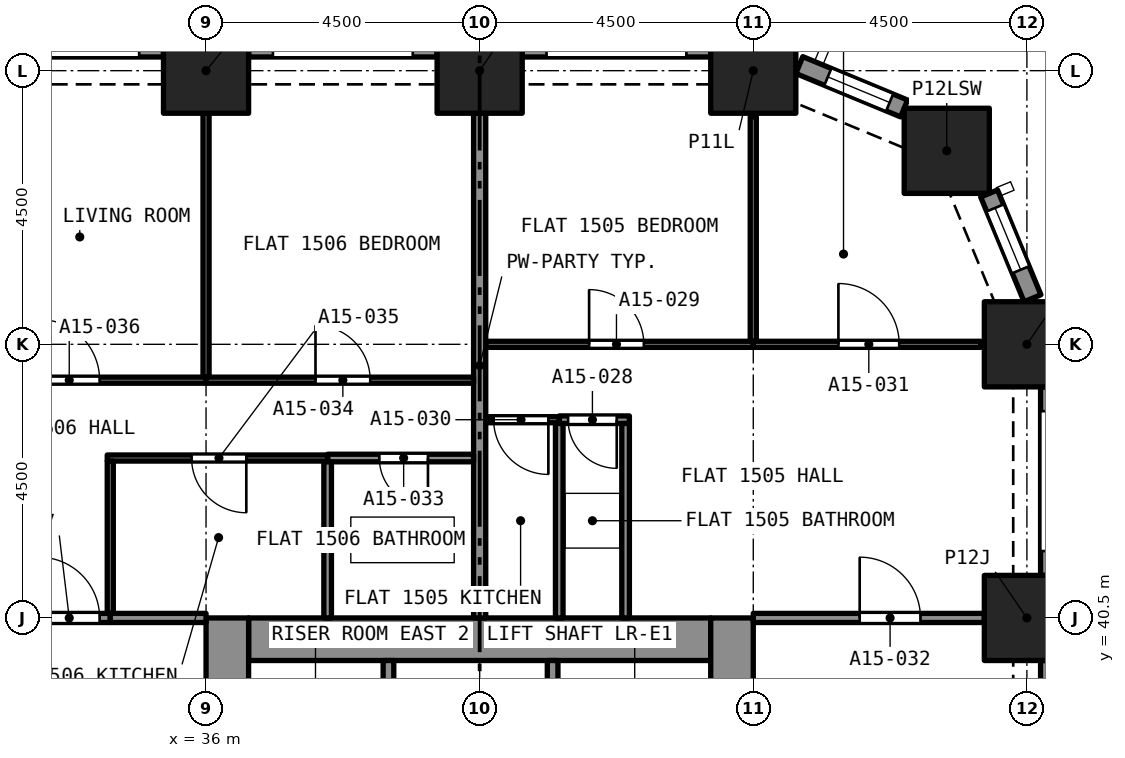
"""IFC4 building model, lengths in metres.
Left out: names, types, materials, properties, quantities, classifications, styles, units other than length and angle.
Written with IfcOpenShell. Run it as: python <this file> out.ifc"""

import sys

from ifc_helpers import new_model, si_unit, direction, frame, frame_2d, origin, origin_2d, place, context, subcontext, project, spatial, rectangle, extrude, element, fill, save


model = new_model("IFC4")
c1 = context("Model", 3, precision=1e-05, world=origin(), true_north=direction((0.0, 1.0)))
c2 = subcontext(c1, "Body", "Model", "MODEL_VIEW")
j1 = project(units=[si_unit("LENGTHUNIT", "METRE"), si_unit("PLANEANGLEUNIT", "RADIAN")], contexts=[c1])
p1 = place(None, origin())
s1 = spatial("IfcSite", under=j1, at=p1, CompositionType="ELEMENT")
p2 = place(p1, origin())
s2 = spatial("IfcBuilding", under=s1, at=p2, CompositionType="ELEMENT")
p3 = place(p2, frame((0.0, 0.0, 59.2)))
s3 = spatial("IfcBuildingStorey", under=s2, at=p3, CompositionType="ELEMENT", Elevation=59.2)
for number, where, z_axis, x_axis in (
    (1, (49.5, 40.5, 0.0), (0.0, 0.0, 1.0), (1.0, 0.0, 0.0)),
    (2, (49.5, 45.0, 0.0), (0.0, 0.0, 1.0), (1.0, 0.0, 0.0)),
    (3, (48.182, 48.182, 0.0), (0.0, 0.0, 1.0), (1.0, 0.0, 0.0)),
    (4, (36.0, 49.5, 0.0), (0.0, 0.0, 1.0), (1.0, 0.0, 0.0)),
    (5, (40.5, 49.5, 0.0), (0.0, 0.0, 1.0), (1.0, 0.0, 0.0)),
    (6, (45.0, 49.5, 0.0), (0.0, 0.0, 1.0), (1.0, 0.0, 0.0)),
):
    element("IfcColumn", number, at=place(p3, frame(where, z_axis=z_axis, x_axis=x_axis)), inside=s3, PredefinedType="COLUMN", context=c2, shape_type="SweptSolid", body=[
        extrude(rectangle(XDim=1.4, YDim=1.4, at=origin_2d()), origin(), (0.0, 0.0, 1.0), 3.2),
    ])
p4 = place(p3, frame((36.7, 40.15, 0.0), z_axis=(0.0, 0.0, 1.0), x_axis=(1.0, 0.0, 0.0)))
e7 = element("IfcWall", 7, at=p4, inside=s3, PredefinedType="SOLIDWALL", context=c2, shape_type="SweptSolid", body=[
    extrude(rectangle(XDim=7.6, YDim=0.7, at=frame_2d((3.8, 0.0))), origin(), (0.0, 0.0, 1.0), 3.2),
])
p5 = place(p3, frame((36.35, 27.0, 0.0), z_axis=(0.0, 0.0, 1.0), x_axis=(0.0, 1.0, 0.0)))
e8 = element("IfcWall", 8, at=p5, inside=s3, PredefinedType="SOLIDWALL", context=c2, shape_type="SweptSolid", body=[
    extrude(rectangle(XDim=13.5, YDim=0.7, at=frame_2d((6.75, 0.0))), origin(), (0.0, 0.0, 1.0), 3.2),
])
p6 = place(p5, frame((8.95, 0.0, 0.0)))
e9 = element("IfcOpeningElement", 9, at=p6, cuts=e8, PredefinedType="OPENING", context=c2, shape_type="SweptSolid", body=[
    extrude(rectangle(XDim=1.2, YDim=2.1, at=frame_2d((0.6, 1.05))), frame((0.0, 0.36, 0.0), z_axis=(0.0, -1.0, 0.0), x_axis=(1.0, 0.0, 0.0)), (0.0, 0.0, 1.0), 0.72),
])
p7 = place(p3, frame((44.65, 27.0, 0.0), z_axis=(0.0, 0.0, 1.0), x_axis=(0.0, 1.0, 0.0)))
e10 = element("IfcWall", 10, at=p7, inside=s3, PredefinedType="SOLIDWALL", context=c2, shape_type="SweptSolid", body=[
    extrude(rectangle(XDim=13.5, YDim=0.7, at=frame_2d((6.75, 0.0))), origin(), (0.0, 0.0, 1.0), 3.2),
])
p8 = place(p7, frame((8.95, 0.0, 0.0)))
e11 = element("IfcOpeningElement", 11, at=p8, cuts=e10, PredefinedType="OPENING", context=c2, shape_type="SweptSolid", body=[
    extrude(rectangle(XDim=1.2, YDim=2.1, at=frame_2d((0.6, 1.05))), frame((0.0, 0.36, 0.0), z_axis=(0.0, -1.0, 0.0), x_axis=(1.0, 0.0, 0.0)), (0.0, 0.0, 1.0), 0.72),
])
p9 = place(p3, frame((49.875, 39.8, 0.0), z_axis=(0.0, 0.0, 1.0), x_axis=(0.0, -1.0, 0.0)))
e12 = element("IfcWall", 12, at=p9, inside=s3, PredefinedType="SOLIDWALL", context=c2, shape_type="SweptSolid", body=[
    extrude(rectangle(XDim=3.1, YDim=0.3, at=frame_2d((1.55, 0.0))), origin(), (0.0, 0.0, 1.0), 3.2),
])
p10 = place(p9, frame((0.4, 0.0, 0.45)))
e13 = element("IfcOpeningElement", 13, at=p10, cuts=e12, PredefinedType="OPENING", context=c2, shape_type="SweptSolid", body=[
    extrude(rectangle(XDim=2.3, YDim=1.95, at=frame_2d((1.15, 0.975))), frame((0.0, 0.16, 0.0), z_axis=(0.0, -1.0, 0.0), x_axis=(1.0, 0.0, 0.0)), (0.0, 0.0, 1.0), 0.32),
])
p11 = place(p3, frame((49.875, 44.3, 0.0), z_axis=(0.0, 0.0, 1.0), x_axis=(0.0, -1.0, 0.0)))
e14 = element("IfcWall", 14, at=p11, inside=s3, PredefinedType="SOLIDWALL", context=c2, shape_type="SweptSolid", body=[
    extrude(rectangle(XDim=3.1, YDim=0.3, at=frame_2d((1.55, 0.0))), origin(), (0.0, 0.0, 1.0), 3.2),
])
p12 = place(p11, frame((0.4, 0.0, 0.45)))
e15 = element("IfcOpeningElement", 15, at=p12, cuts=e14, PredefinedType="OPENING", context=c2, shape_type="SweptSolid", body=[
    extrude(rectangle(XDim=2.3, YDim=1.95, at=frame_2d((1.15, 0.975))), frame((0.0, 0.16, 0.0), z_axis=(0.0, -1.0, 0.0), x_axis=(1.0, 0.0, 0.0)), (0.0, 0.0, 1.0), 0.32),
])
p13 = place(p3, frame((48.878, 47.48, 0.0), z_axis=(0.0, 0.0, 1.0), x_axis=(0.38262540684, -0.923903565336, 0.0)))
e16 = element("IfcWall", 16, at=p13, inside=s3, PredefinedType="SOLIDWALL", context=c2, shape_type="SweptSolid", body=[
    extrude(rectangle(XDim=1.865, YDim=0.3, at=frame_2d((0.933, 0.0))), origin(), (0.0, 0.0, 1.0), 3.2),
])
p14 = place(p13, frame((0.258, 0.0, 0.45)))
e17 = element("IfcOpeningElement", 17, at=p14, cuts=e16, PredefinedType="OPENING", context=c2, shape_type="SweptSolid", body=[
    extrude(rectangle(XDim=1.1, YDim=1.95, at=frame_2d((0.55, 0.975))), frame((0.0, 0.16, 0.0), z_axis=(0.0, -1.0, 0.0), x_axis=(1.0, 0.0, 0.0)), (0.0, 0.0, 1.0), 0.32),
])
p15 = place(p3, frame((45.757, 49.592, 0.0), z_axis=(0.0, 0.0, 1.0), x_axis=(0.923857286003, -0.382737135771, 0.0)))
e18 = element("IfcWall", 18, at=p15, inside=s3, PredefinedType="SOLIDWALL", context=c2, shape_type="SweptSolid", body=[
    extrude(rectangle(XDim=1.865, YDim=0.3, at=frame_2d((0.933, 0.0))), origin(), (0.0, 0.0, 1.0), 3.2),
])
p16 = place(p15, frame((0.508, 0.0, 0.45)))
e19 = element("IfcOpeningElement", 19, at=p16, cuts=e18, PredefinedType="OPENING", context=c2, shape_type="SweptSolid", body=[
    extrude(rectangle(XDim=1.1, YDim=1.95, at=frame_2d((0.55, 0.975))), frame((0.0, 0.16, 0.0), z_axis=(0.0, -1.0, 0.0), x_axis=(1.0, 0.0, 0.0)), (0.0, 0.0, 1.0), 0.32),
])
p17 = place(p3, frame((41.2, 49.875, 0.0), z_axis=(0.0, 0.0, 1.0), x_axis=(1.0, 0.0, 0.0)))
e20 = element("IfcWall", 20, at=p17, inside=s3, PredefinedType="SOLIDWALL", context=c2, shape_type="SweptSolid", body=[
    extrude(rectangle(XDim=3.1, YDim=0.3, at=frame_2d((1.55, 0.0))), origin(), (0.0, 0.0, 1.0), 3.2),
])
p18 = place(p17, frame((0.4, 0.0, 0.45)))
e21 = element("IfcOpeningElement", 21, at=p18, cuts=e20, PredefinedType="OPENING", context=c2, shape_type="SweptSolid", body=[
    extrude(rectangle(XDim=2.3, YDim=1.95, at=frame_2d((1.15, 0.975))), frame((0.0, 0.16, 0.0), z_axis=(0.0, -1.0, 0.0), x_axis=(1.0, 0.0, 0.0)), (0.0, 0.0, 1.0), 0.32),
])
p19 = place(p3, frame((36.7, 49.875, 0.0), z_axis=(0.0, 0.0, 1.0), x_axis=(1.0, 0.0, 0.0)))
e22 = element("IfcWall", 22, at=p19, inside=s3, PredefinedType="SOLIDWALL", context=c2, shape_type="SweptSolid", body=[
    extrude(rectangle(XDim=3.1, YDim=0.3, at=frame_2d((1.55, 0.0))), origin(), (0.0, 0.0, 1.0), 3.2),
])
p20 = place(p19, frame((0.4, 0.0, 0.45)))
e23 = element("IfcOpeningElement", 23, at=p20, cuts=e22, PredefinedType="OPENING", context=c2, shape_type="SweptSolid", body=[
    extrude(rectangle(XDim=2.3, YDim=1.95, at=frame_2d((1.15, 0.975))), frame((0.0, 0.16, 0.0), z_axis=(0.0, -1.0, 0.0), x_axis=(1.0, 0.0, 0.0)), (0.0, 0.0, 1.0), 0.32),
])
p21 = place(p3, frame((32.2, 49.875, 0.0), z_axis=(0.0, 0.0, 1.0), x_axis=(1.0, 0.0, 0.0)))
e24 = element("IfcWall", 24, at=p21, inside=s3, PredefinedType="SOLIDWALL", context=c2, shape_type="SweptSolid", body=[
    extrude(rectangle(XDim=3.1, YDim=0.3, at=frame_2d((1.55, 0.0))), origin(), (0.0, 0.0, 1.0), 3.2),
])
p22 = place(p21, frame((0.4, 0.0, 0.45)))
e25 = element("IfcOpeningElement", 25, at=p22, cuts=e24, PredefinedType="OPENING", context=c2, shape_type="SweptSolid", body=[
    extrude(rectangle(XDim=2.3, YDim=1.95, at=frame_2d((1.15, 0.975))), frame((0.0, 0.16, 0.0), z_axis=(0.0, -1.0, 0.0), x_axis=(1.0, 0.0, 0.0)), (0.0, 0.0, 1.0), 0.32),
])
p23 = place(p3, frame((42.962, 43.76, 0.0), z_axis=(0.0, 0.0, 1.0), x_axis=(-1.0, 0.0, 0.0)))
e26 = element("IfcWall", 26, at=p23, inside=s3, PredefinedType="PARTITIONING", context=c2, shape_type="SweptSolid", body=[
    extrude(rectangle(XDim=1.153, YDim=0.125, at=frame_2d((0.577, 0.0))), origin(), (0.0, 0.0, 1.0), 2.9),
])
p24 = place(p23, frame((0.208, 0.0, 0.0)))
e27 = element("IfcOpeningElement", 27, at=p24, cuts=e26, PredefinedType="OPENING", context=c2, shape_type="SweptSolid", body=[
    extrude(rectangle(XDim=0.8, YDim=2.1, at=frame_2d((0.4, 1.05))), frame((0.0, 0.073, 0.0), z_axis=(0.0, -1.0, 0.0), x_axis=(1.0, 0.0, 0.0)), (0.0, 0.0, 1.0), 0.145),
])
for number, where, z_axis, x_axis in (
    (28, (42.9, 40.5, 0.0), (0.0, 0.0, 1.0), (0.0, 1.0, 0.0)),
    (29, (41.809, 40.5, 0.0), (0.0, 0.0, 1.0), (0.0, 1.0, 0.0)),
):
    element("IfcWall", number, at=place(p3, frame(where, z_axis=z_axis, x_axis=x_axis)), inside=s3, PredefinedType="PARTITIONING", context=c2, shape_type="SweptSolid", body=[
        extrude(rectangle(XDim=3.198, YDim=0.125, at=frame_2d((1.599, 0.0))), origin(), (0.0, 0.0, 1.0), 2.9),
    ])
p25 = place(p3, frame((40.6, 45.0, 0.0), z_axis=(0.0, 0.0, 1.0), x_axis=(1.0, 0.0, 0.0)))
e30 = element("IfcWall", 30, at=p25, inside=s3, PredefinedType="PARTITIONING", context=c2, shape_type="SweptSolid", body=[
    extrude(rectangle(XDim=4.4, YDim=0.1, at=frame_2d((2.2, 0.0))), origin(), (0.0, 0.0, 1.0), 2.9),
])
p26 = place(p25, frame((1.7, 0.0, 0.0)))
e31 = element("IfcOpeningElement", 31, at=p26, cuts=e30, PredefinedType="OPENING", context=c2, shape_type="SweptSolid", body=[
    extrude(rectangle(XDim=0.9, YDim=2.1, at=frame_2d((0.45, 1.05))), frame((0.0, 0.06, 0.0), z_axis=(0.0, -1.0, 0.0), x_axis=(1.0, 0.0, 0.0)), (0.0, 0.0, 1.0), 0.12),
])
p27 = place(p3, frame((45.0, 45.05, 0.0), z_axis=(0.0, 0.0, 1.0), x_axis=(0.0, 1.0, 0.0)))
e32 = element("IfcWall", 32, at=p27, inside=s3, PredefinedType="PARTITIONING", context=c2, shape_type="SweptSolid", body=[
    extrude(rectangle(XDim=3.692, YDim=0.1, at=frame_2d((1.846, 0.0))), origin(), (0.0, 0.0, 1.0), 2.9),
])
p28 = place(p3, frame((41.809, 43.76, 0.0), z_axis=(0.0, 0.0, 1.0), x_axis=(-1.0, 0.0, 0.0)))
e33 = element("IfcWall", 33, at=p28, inside=s3, PredefinedType="PARTITIONING", context=c2, shape_type="SweptSolid", body=[
    extrude(rectangle(XDim=1.209, YDim=0.1, at=frame_2d((0.604, 0.0))), origin(), (0.0, 0.0, 1.0), 2.9),
])
p29 = place(p28, frame((0.179, 0.0, 0.0)))
e34 = element("IfcOpeningElement", 34, at=p29, cuts=e33, PredefinedType="OPENING", context=c2, shape_type="SweptSolid", body=[
    extrude(rectangle(XDim=0.9, YDim=2.1, at=frame_2d((0.45, 1.05))), frame((0.0, 0.06, 0.0), z_axis=(0.0, -1.0, 0.0), x_axis=(1.0, 0.0, 0.0)), (0.0, 0.0, 1.0), 0.12),
])
p30 = place(p3, frame((45.0, 45.0, 0.0), z_axis=(0.0, 0.0, 1.0), x_axis=(1.0, 0.0, 0.0)))
e35 = element("IfcWall", 35, at=p30, inside=s3, PredefinedType="PARTITIONING", context=c2, shape_type="SweptSolid", body=[
    extrude(rectangle(XDim=3.742, YDim=0.1, at=frame_2d((1.871, 0.0))), origin(), (0.0, 0.0, 1.0), 2.9),
])
p31 = place(p30, frame((1.4, 0.0, 0.0)))
e36 = element("IfcOpeningElement", 36, at=p31, cuts=e35, PredefinedType="OPENING", context=c2, shape_type="SweptSolid", body=[
    extrude(rectangle(XDim=1.0, YDim=2.1, at=frame_2d((0.5, 1.05))), frame((0.0, 0.06, 0.0), z_axis=(0.0, -1.0, 0.0), x_axis=(1.0, 0.0, 0.0)), (0.0, 0.0, 1.0), 0.12),
])
p32 = place(p3, frame((45.0, 40.5, 0.0), z_axis=(0.0, 0.0, 1.0), x_axis=(1.0, 0.0, 0.0)))
e37 = element("IfcWall", 37, at=p32, inside=s3, PredefinedType="PARTITIONING", context=c2, shape_type="SweptSolid", body=[
    extrude(rectangle(XDim=3.8, YDim=0.15, at=frame_2d((1.9, 0.0))), origin(), (0.0, 0.0, 1.0), 2.9),
])
p33 = place(p32, frame((1.75, 0.0, 0.0)))
e38 = element("IfcOpeningElement", 38, at=p33, cuts=e37, PredefinedType="OPENING", context=c2, shape_type="SweptSolid", body=[
    extrude(rectangle(XDim=1.0, YDim=2.1, at=frame_2d((0.5, 1.05))), frame((0.0, 0.085, 0.0), z_axis=(0.0, -1.0, 0.0), x_axis=(1.0, 0.0, 0.0)), (0.0, 0.0, 1.0), 0.17),
])
p34 = place(p3, frame((40.5, 40.5, 0.0), z_axis=(0.0, 0.0, 1.0), x_axis=(0.0, 1.0, 0.0)))
e39 = element("IfcWall", 39, at=p34, inside=s3, PredefinedType="PARTITIONING", context=c2, shape_type="SweptSolid", body=[
    extrude(rectangle(XDim=8.3, YDim=0.2, at=frame_2d((4.15, 0.0))), origin(), (0.0, 0.0, 1.0), 2.9),
])
p35 = place(p3, frame((40.4, 43.13, 0.0), z_axis=(0.0, 0.0, 1.0), x_axis=(-1.0, 0.0, 0.0)))
e40 = element("IfcWall", 40, at=p35, inside=s3, PredefinedType="PARTITIONING", context=c2, shape_type="SweptSolid", body=[
    extrude(rectangle(XDim=2.4, YDim=0.125, at=frame_2d((1.2, 0.0))), origin(), (0.0, 0.0, 1.0), 2.9),
])
p36 = place(p35, frame((0.75, 0.0, 0.0)))
e41 = element("IfcOpeningElement", 41, at=p36, cuts=e40, PredefinedType="OPENING", context=c2, shape_type="SweptSolid", body=[
    extrude(rectangle(XDim=0.8, YDim=2.1, at=frame_2d((0.4, 1.05))), frame((0.0, 0.073, 0.0), z_axis=(0.0, -1.0, 0.0), x_axis=(1.0, 0.0, 0.0)), (0.0, 0.0, 1.0), 0.145),
])
p37 = place(p3, frame((38.0, 40.5, 0.0), z_axis=(0.0, 0.0, 1.0), x_axis=(0.0, 1.0, 0.0)))
e42 = element("IfcWall", 42, at=p37, inside=s3, PredefinedType="PARTITIONING", context=c2, shape_type="SweptSolid", body=[
    extrude(rectangle(XDim=2.567, YDim=0.125, at=frame_2d((1.284, 0.0))), origin(), (0.0, 0.0, 1.0), 2.9),
])
p38 = place(p3, frame((36.0, 44.41, 0.0), z_axis=(0.0, 0.0, 1.0), x_axis=(1.0, 0.0, 0.0)))
e43 = element("IfcWall", 43, at=p38, inside=s3, PredefinedType="PARTITIONING", context=c2, shape_type="SweptSolid", body=[
    extrude(rectangle(XDim=4.4, YDim=0.1, at=frame_2d((2.2, 0.0))), origin(), (0.0, 0.0, 1.0), 2.9),
])
p39 = place(p38, frame((1.8, 0.0, 0.0)))
e44 = element("IfcOpeningElement", 44, at=p39, cuts=e43, PredefinedType="OPENING", context=c2, shape_type="SweptSolid", body=[
    extrude(rectangle(XDim=0.9, YDim=2.1, at=frame_2d((0.45, 1.05))), frame((0.0, 0.06, 0.0), z_axis=(0.0, -1.0, 0.0), x_axis=(1.0, 0.0, 0.0)), (0.0, 0.0, 1.0), 0.12),
])
p40 = place(p3, frame((36.0, 44.46, 0.0), z_axis=(0.0, 0.0, 1.0), x_axis=(0.0, 1.0, 0.0)))
e45 = element("IfcWall", 45, at=p40, inside=s3, PredefinedType="PARTITIONING", context=c2, shape_type="SweptSolid", body=[
    extrude(rectangle(XDim=4.34, YDim=0.1, at=frame_2d((2.17, 0.0))), origin(), (0.0, 0.0, 1.0), 2.9),
])
p41 = place(p3, frame((38.0, 43.13, 0.0), z_axis=(0.0, 0.0, 1.0), x_axis=(-1.0, 0.0, 0.0)))
e46 = element("IfcWall", 46, at=p41, inside=s3, PredefinedType="PARTITIONING", context=c2, shape_type="SweptSolid", body=[
    extrude(rectangle(XDim=3.625, YDim=0.1, at=frame_2d((1.812, 0.0))), origin(), (0.0, 0.0, 1.0), 2.9),
])
p42 = place(p41, frame((1.337, 0.0, 0.0)))
e47 = element("IfcOpeningElement", 47, at=p42, cuts=e46, PredefinedType="OPENING", context=c2, shape_type="SweptSolid", body=[
    extrude(rectangle(XDim=0.9, YDim=2.1, at=frame_2d((0.45, 1.05))), frame((0.0, 0.06, 0.0), z_axis=(0.0, -1.0, 0.0), x_axis=(1.0, 0.0, 0.0)), (0.0, 0.0, 1.0), 0.12),
])
p43 = place(p3, frame((34.425, 40.575, 0.0), z_axis=(0.0, 0.0, 1.0), x_axis=(0.0, 1.0, 0.0)))
e48 = element("IfcWall", 48, at=p43, inside=s3, PredefinedType="PARTITIONING", context=c2, shape_type="SweptSolid", body=[
    extrude(rectangle(XDim=2.505, YDim=0.1, at=frame_2d((1.252, 0.0))), origin(), (0.0, 0.0, 1.0), 2.9),
])
p44 = place(p3, frame((32.2, 44.41, 0.0), z_axis=(0.0, 0.0, 1.0), x_axis=(1.0, 0.0, 0.0)))
e49 = element("IfcWall", 49, at=p44, inside=s3, PredefinedType="PARTITIONING", context=c2, shape_type="SweptSolid", body=[
    extrude(rectangle(XDim=3.8, YDim=0.1, at=frame_2d((1.9, 0.0))), origin(), (0.0, 0.0, 1.0), 2.9),
])
p45 = place(p44, frame((1.05, 0.0, 0.0)))
e50 = element("IfcOpeningElement", 50, at=p45, cuts=e49, PredefinedType="OPENING", context=c2, shape_type="SweptSolid", body=[
    extrude(rectangle(XDim=1.0, YDim=2.1, at=frame_2d((0.5, 1.05))), frame((0.0, 0.06, 0.0), z_axis=(0.0, -1.0, 0.0), x_axis=(1.0, 0.0, 0.0)), (0.0, 0.0, 1.0), 0.12),
])
p46 = place(p3, frame((32.2, 40.5, 0.0), z_axis=(0.0, 0.0, 1.0), x_axis=(1.0, 0.0, 0.0)))
e51 = element("IfcWall", 51, at=p46, inside=s3, PredefinedType="PARTITIONING", context=c2, shape_type="SweptSolid", body=[
    extrude(rectangle(XDim=2.225, YDim=0.15, at=frame_2d((1.113, 0.0))), origin(), (0.0, 0.0, 1.0), 2.9),
])
p47 = place(p46, frame((1.05, 0.0, 0.0)))
e52 = element("IfcOpeningElement", 52, at=p47, cuts=e51, PredefinedType="OPENING", context=c2, shape_type="SweptSolid", body=[
    extrude(rectangle(XDim=1.0, YDim=2.1, at=frame_2d((0.5, 1.05))), frame((0.0, 0.085, 0.0), z_axis=(0.0, -1.0, 0.0), x_axis=(1.0, 0.0, 0.0)), (0.0, 0.0, 1.0), 0.17),
])
p48 = place(p3, frame((34.425, 40.5, 0.0), z_axis=(0.0, 0.0, 1.0), x_axis=(1.0, 0.0, 0.0)))
e53 = element("IfcWall", 53, at=p48, inside=s3, PredefinedType="PARTITIONING", context=c2, shape_type="SweptSolid", body=[
    extrude(rectangle(XDim=1.575, YDim=0.15, at=frame_2d((0.788, 0.0))), origin(), (0.0, 0.0, 1.0), 2.9),
])
for number, where, z_axis, x_axis in (
    (54, (41.7, 37.5, 0.0), (0.0, 0.0, 1.0), (0.0, 1.0, 0.0)),
    (55, (39.0, 37.5, 0.0), (0.0, 0.0, 1.0), (0.0, 1.0, 0.0)),
):
    element("IfcWall", number, at=place(p3, frame(where, z_axis=z_axis, x_axis=x_axis)), inside=s3, PredefinedType="SOLIDWALL", context=c2, shape_type="SweptSolid", body=[
        extrude(rectangle(XDim=2.3, YDim=0.175, at=frame_2d((1.15, 0.0))), origin(), (0.0, 0.0, 1.0), 2.9),
    ])
p49 = place(p14, origin())
e56 = element("IfcWindow", 56, at=p49, inside=s3, PartitioningType="SINGLE_PANEL", PredefinedType="WINDOW", context=c2, shape_type="SweptSolid", body=[
    extrude(rectangle(XDim=1.1, YDim=1.95, at=frame_2d((0.55, 0.975))), frame((0.0, 0.03, 0.0), z_axis=(0.0, -1.0, 0.0), x_axis=(1.0, 0.0, 0.0)), (0.0, 0.0, 1.0), 0.06),
])
fill(e17, e56)
p50 = place(p16, origin())
e57 = element("IfcWindow", 57, at=p50, inside=s3, PartitioningType="SINGLE_PANEL", PredefinedType="WINDOW", context=c2, shape_type="SweptSolid", body=[
    extrude(rectangle(XDim=1.1, YDim=1.95, at=frame_2d((0.55, 0.975))), frame((0.0, 0.03, 0.0), z_axis=(0.0, -1.0, 0.0), x_axis=(1.0, 0.0, 0.0)), (0.0, 0.0, 1.0), 0.06),
])
fill(e19, e57)
p51 = place(p24, origin())
e58 = element("IfcDoor", 58, at=p51, inside=s3, OperationType="SINGLE_SWING_RIGHT", PredefinedType="DOOR", context=c2, shape_type="SweptSolid", body=[
    extrude(rectangle(XDim=0.8, YDim=2.1, at=frame_2d((0.4, 1.05))), frame((0.0, 0.025, 0.0), z_axis=(0.0, -1.0, 0.0), x_axis=(1.0, 0.0, 0.0)), (0.0, 0.0, 1.0), 0.05),
])
fill(e27, e58)
p52 = place(p26, origin())
e59 = element("IfcDoor", 59, at=p52, inside=s3, OperationType="SINGLE_SWING_LEFT", PredefinedType="DOOR", context=c2, shape_type="SweptSolid", body=[
    extrude(rectangle(XDim=0.9, YDim=2.1, at=frame_2d((0.45, 1.05))), frame((0.0, 0.025, 0.0), z_axis=(0.0, -1.0, 0.0), x_axis=(1.0, 0.0, 0.0)), (0.0, 0.0, 1.0), 0.05),
])
fill(e31, e59)
p53 = place(p29, origin())
e60 = element("IfcDoor", 60, at=p53, inside=s3, OperationType="SINGLE_SWING_RIGHT", PredefinedType="DOOR", context=c2, shape_type="SweptSolid", body=[
    extrude(rectangle(XDim=0.9, YDim=2.1, at=frame_2d((0.45, 1.05))), frame((0.0, 0.025, 0.0), z_axis=(0.0, -1.0, 0.0), x_axis=(1.0, 0.0, 0.0)), (0.0, 0.0, 1.0), 0.05),
])
fill(e34, e60)
p54 = place(p31, origin())
e61 = element("IfcDoor", 61, at=p54, inside=s3, OperationType="SINGLE_SWING_RIGHT", PredefinedType="DOOR", context=c2, shape_type="SweptSolid", body=[
    extrude(rectangle(XDim=1.0, YDim=2.1, at=frame_2d((0.5, 1.05))), frame((0.0, 0.025, 0.0), z_axis=(0.0, -1.0, 0.0), x_axis=(1.0, 0.0, 0.0)), (0.0, 0.0, 1.0), 0.05),
])
fill(e36, e61)
p55 = place(p33, origin())
e62 = element("IfcDoor", 62, at=p55, inside=s3, OperationType="SINGLE_SWING_RIGHT", PredefinedType="DOOR", context=c2, shape_type="SweptSolid", body=[
    extrude(rectangle(XDim=1.0, YDim=2.1, at=frame_2d((0.5, 1.05))), frame((0.0, 0.025, 0.0), z_axis=(0.0, -1.0, 0.0), x_axis=(1.0, 0.0, 0.0)), (0.0, 0.0, 1.0), 0.05),
])
fill(e38, e62)
p56 = place(p36, origin())
e63 = element("IfcDoor", 63, at=p56, inside=s3, OperationType="SINGLE_SWING_LEFT", PredefinedType="DOOR", context=c2, shape_type="SweptSolid", body=[
    extrude(rectangle(XDim=0.8, YDim=2.1, at=frame_2d((0.4, 1.05))), frame((0.0, 0.025, 0.0), z_axis=(0.0, -1.0, 0.0), x_axis=(1.0, 0.0, 0.0)), (0.0, 0.0, 1.0), 0.05),
])
fill(e41, e63)
p57 = place(p39, origin())
e64 = element("IfcDoor", 64, at=p57, inside=s3, OperationType="SINGLE_SWING_RIGHT", PredefinedType="DOOR", context=c2, shape_type="SweptSolid", body=[
    extrude(rectangle(XDim=0.9, YDim=2.1, at=frame_2d((0.45, 1.05))), frame((0.0, 0.025, 0.0), z_axis=(0.0, -1.0, 0.0), x_axis=(1.0, 0.0, 0.0)), (0.0, 0.0, 1.0), 0.05),
])
fill(e44, e64)
p58 = place(p42, origin())
e65 = element("IfcDoor", 65, at=p58, inside=s3, OperationType="SINGLE_SWING_LEFT", PredefinedType="DOOR", context=c2, shape_type="SweptSolid", body=[
    extrude(rectangle(XDim=0.9, YDim=2.1, at=frame_2d((0.45, 1.05))), frame((0.0, 0.025, 0.0), z_axis=(0.0, -1.0, 0.0), x_axis=(1.0, 0.0, 0.0)), (0.0, 0.0, 1.0), 0.05),
])
fill(e47, e65)
p59 = place(p45, origin())
e66 = element("IfcDoor", 66, at=p59, inside=s3, OperationType="SINGLE_SWING_LEFT", PredefinedType="DOOR", context=c2, shape_type="SweptSolid", body=[
    extrude(rectangle(XDim=1.0, YDim=2.1, at=frame_2d((0.5, 1.05))), frame((0.0, 0.025, 0.0), z_axis=(0.0, -1.0, 0.0), x_axis=(1.0, 0.0, 0.0)), (0.0, 0.0, 1.0), 0.05),
])
fill(e50, e66)
p60 = place(p47, origin())
e67 = element("IfcDoor", 67, at=p60, inside=s3, OperationType="SINGLE_SWING_RIGHT", PredefinedType="DOOR", context=c2, shape_type="SweptSolid", body=[
    extrude(rectangle(XDim=1.0, YDim=2.1, at=frame_2d((0.5, 1.05))), frame((0.0, 0.025, 0.0), z_axis=(0.0, -1.0, 0.0), x_axis=(1.0, 0.0, 0.0)), (0.0, 0.0, 1.0), 0.05),
])
fill(e52, e67)
save(model, sys.argv[1])
